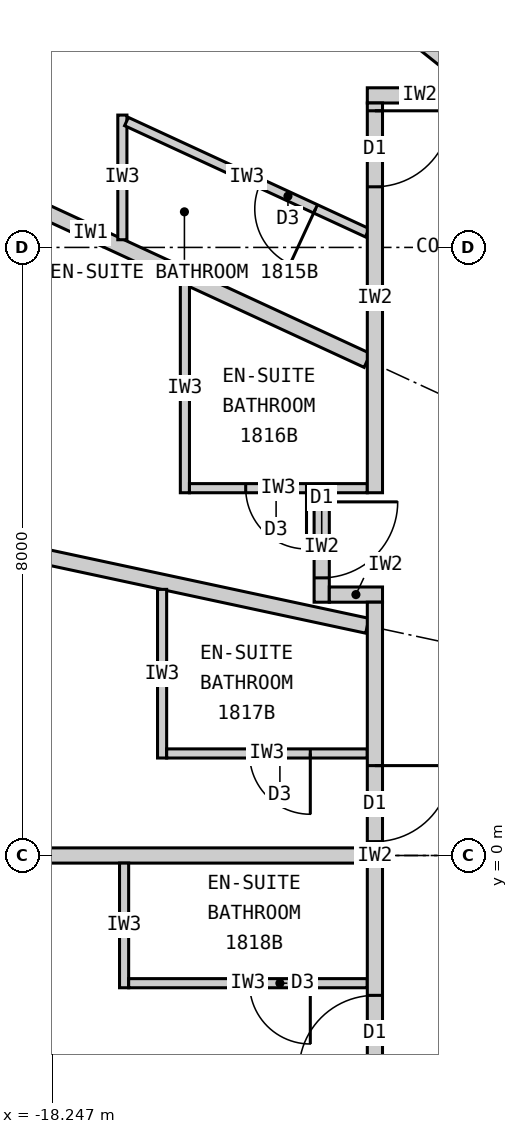
"""IFC4 building model, lengths in metres.
Left out: names, types, materials, properties, quantities, classifications, styles, units other than length and angle.
Written with IfcOpenShell. Run it as: python <this file> out.ifc"""

import sys

from ifc_helpers import new_model, si_unit, direction, frame, frame_2d, origin, place, context, subcontext, project, spatial, rectangle, extrude, element, fill, save


model = new_model("IFC4")
c1 = context("Model", 3, precision=1e-05, world=origin(), true_north=direction((0.0, 1.0)))
c2 = subcontext(c1, "Body", "Model", "MODEL_VIEW")
j1 = project(units=[si_unit("LENGTHUNIT", "METRE"), si_unit("PLANEANGLEUNIT", "RADIAN")], contexts=[c1])
p1 = place(None, origin())
s1 = spatial("IfcSite", under=j1, at=p1, CompositionType="ELEMENT")
p2 = place(p1, origin())
s2 = spatial("IfcBuilding", under=s1, at=p2, CompositionType="ELEMENT")
p3 = place(p2, frame((0.0, 0.0, 73.8)))
s3 = spatial("IfcBuildingStorey", under=s2, at=p3, CompositionType="ELEMENT", Elevation=73.8)
p4 = place(p3, frame((-12.625, 10.1, 0.0), z_axis=(0.0, 0.0, 1.0), x_axis=(-0.780892451574, 0.624665493744, 0.0)))
e1 = element("IfcWall", 1, at=p4, inside=s3, PredefinedType="PARTITIONING", context=c2, shape_type="SweptSolid", body=[
    extrude(rectangle(XDim=6.045, YDim=0.2, at=frame_2d((3.022, 0.0))), origin(), (0.0, 0.0, 1.0), 2.32),
])
p5 = place(p3, frame((-14.1, 6.512, 0.0), z_axis=(0.0, 0.0, 1.0), x_axis=(-0.907832871056, 0.419332181247, 0.0)))
e2 = element("IfcWall", 2, at=p5, inside=s3, PredefinedType="PARTITIONING", context=c2, shape_type="SweptSolid", body=[
    extrude(rectangle(XDim=8.023, YDim=0.2, at=frame_2d((4.011, 0.0))), origin(), (0.0, 0.0, 1.0), 2.32),
])
p6 = place(p3, frame((-14.1, 3.022, 0.0), z_axis=(0.0, 0.0, 1.0), x_axis=(-0.977790014929, 0.209586943072, 0.0)))
e3 = element("IfcWall", 3, at=p6, inside=s3, PredefinedType="PARTITIONING", context=c2, shape_type="SweptSolid", body=[
    extrude(rectangle(XDim=10.087, YDim=0.2, at=frame_2d((5.043, 0.0))), origin(), (0.0, 0.0, 1.0), 2.32),
])
p7 = place(p3, frame((-14.1, 0.0, 0.0), z_axis=(0.0, 0.0, 1.0), x_axis=(-1.0, 0.0, 0.0)))
e4 = element("IfcWall", 4, at=p7, inside=s3, PredefinedType="PARTITIONING", context=c2, shape_type="SweptSolid", body=[
    extrude(rectangle(XDim=10.75, YDim=0.2, at=frame_2d((5.375, 0.0))), origin(), (0.0, 0.0, 1.0), 2.27),
])
p8 = place(p3, frame((-17.323, 8.101, 0.0), z_axis=(0.0, 0.0, 1.0), x_axis=(0.0, 1.0, 0.0)))
e5 = element("IfcWall", 5, at=p8, inside=s3, PredefinedType="PARTITIONING", context=c2, shape_type="SweptSolid", body=[
    extrude(rectangle(XDim=1.64, YDim=0.12, at=frame_2d((0.82, 0.0))), origin(), (0.0, 0.0, 1.0), 3.12),
])
p9 = place(p3, frame((-14.1, 8.193, 0.0), z_axis=(0.0, 0.0, 1.0), x_axis=(-0.907836493557, 0.419324338628, 0.0)))
e6 = element("IfcWall", 6, at=p9, inside=s3, PredefinedType="PARTITIONING", context=c2, shape_type="SweptSolid", body=[
    extrude(rectangle(XDim=3.49, YDim=0.12, at=frame_2d((1.745, 0.0))), origin(), (0.0, 0.0, 1.0), 3.12),
])
p10 = place(p9, frame((0.75, 0.0, 0.0)))
e7 = element("IfcOpeningElement", 7, at=p10, cuts=e6, PredefinedType="OPENING", context=c2, shape_type="SweptSolid", body=[
    extrude(rectangle(XDim=0.8, YDim=2.1, at=frame_2d((0.4, 1.05))), frame((0.0, 0.07, 0.0), z_axis=(0.0, -1.0, 0.0), x_axis=(1.0, 0.0, 0.0)), (0.0, 0.0, 1.0), 0.14),
])
p11 = place(p3, frame((-16.5, 7.521, 0.0), z_axis=(0.0, 0.0, 1.0), x_axis=(0.0, -1.0, 0.0)))
e8 = element("IfcWall", 8, at=p11, inside=s3, PredefinedType="PARTITIONING", context=c2, shape_type="SweptSolid", body=[
    extrude(rectangle(XDim=2.749, YDim=0.12, at=frame_2d((1.374, 0.0))), origin(), (0.0, 0.0, 1.0), 3.12),
])
p12 = place(p3, frame((-14.1, 4.833, 0.0), z_axis=(0.0, 0.0, 1.0), x_axis=(-1.0, 0.0, 0.0)))
e9 = element("IfcWall", 9, at=p12, inside=s3, PredefinedType="PARTITIONING", context=c2, shape_type="SweptSolid", body=[
    extrude(rectangle(XDim=2.34, YDim=0.12, at=frame_2d((1.17, 0.0))), origin(), (0.0, 0.0, 1.0), 3.12),
])
p13 = place(p12, frame((0.8, 0.0, 0.0)))
e10 = element("IfcOpeningElement", 10, at=p13, cuts=e9, PredefinedType="OPENING", context=c2, shape_type="SweptSolid", body=[
    extrude(rectangle(XDim=0.8, YDim=2.1, at=frame_2d((0.4, 1.05))), frame((0.0, 0.07, 0.0), z_axis=(0.0, -1.0, 0.0), x_axis=(1.0, 0.0, 0.0)), (0.0, 0.0, 1.0), 0.14),
])
p14 = place(p3, frame((-16.8, 3.501, 0.0), z_axis=(0.0, 0.0, 1.0), x_axis=(0.0, -1.0, 0.0)))
e11 = element("IfcWall", 11, at=p14, inside=s3, PredefinedType="PARTITIONING", context=c2, shape_type="SweptSolid", body=[
    extrude(rectangle(XDim=2.219, YDim=0.12, at=frame_2d((1.109, 0.0))), origin(), (0.0, 0.0, 1.0), 3.12),
])
p15 = place(p3, frame((-14.1, 1.343, 0.0), z_axis=(0.0, 0.0, 1.0), x_axis=(-1.0, 0.0, 0.0)))
e12 = element("IfcWall", 12, at=p15, inside=s3, PredefinedType="PARTITIONING", context=c2, shape_type="SweptSolid", body=[
    extrude(rectangle(XDim=2.64, YDim=0.12, at=frame_2d((1.32, 0.0))), origin(), (0.0, 0.0, 1.0), 3.12),
])
p16 = place(p15, frame((0.75, 0.0, 0.0)))
e13 = element("IfcOpeningElement", 13, at=p16, cuts=e12, PredefinedType="OPENING", context=c2, shape_type="SweptSolid", body=[
    extrude(rectangle(XDim=0.8, YDim=2.1, at=frame_2d((0.4, 1.05))), frame((0.0, 0.07, 0.0), z_axis=(0.0, -1.0, 0.0), x_axis=(1.0, 0.0, 0.0)), (0.0, 0.0, 1.0), 0.14),
])
p17 = place(p3, frame((-17.3, -0.1, 0.0), z_axis=(0.0, 0.0, 1.0), x_axis=(0.0, -1.0, 0.0)))
e14 = element("IfcWall", 14, at=p17, inside=s3, PredefinedType="PARTITIONING", context=c2, shape_type="SweptSolid", body=[
    extrude(rectangle(XDim=1.64, YDim=0.12, at=frame_2d((0.82, 0.0))), origin(), (0.0, 0.0, 1.0), 3.12),
])
p18 = place(p3, frame((-14.1, -1.68, 0.0), z_axis=(0.0, 0.0, 1.0), x_axis=(-1.0, 0.0, 0.0)))
e15 = element("IfcWall", 15, at=p18, inside=s3, PredefinedType="PARTITIONING", context=c2, shape_type="SweptSolid", body=[
    extrude(rectangle(XDim=3.14, YDim=0.12, at=frame_2d((1.57, 0.0))), origin(), (0.0, 0.0, 1.0), 3.12),
])
p19 = place(p18, frame((0.75, 0.0, 0.0)))
e16 = element("IfcOpeningElement", 16, at=p19, cuts=e15, PredefinedType="OPENING", context=c2, shape_type="SweptSolid", body=[
    extrude(rectangle(XDim=0.8, YDim=2.1, at=frame_2d((0.4, 1.05))), frame((0.0, 0.07, 0.0), z_axis=(0.0, -1.0, 0.0), x_axis=(1.0, 0.0, 0.0)), (0.0, 0.0, 1.0), 0.14),
])
p20 = place(p3, frame((-14.7, 4.772, 0.0), z_axis=(0.0, 0.0, 1.0), x_axis=(0.0, -1.0, 0.0)))
e17 = element("IfcWall", 17, at=p20, inside=s3, PredefinedType="PARTITIONING", context=c2, shape_type="SweptSolid", body=[
    extrude(rectangle(XDim=1.44, YDim=0.2, at=frame_2d((0.72, 0.0))), origin(), (0.0, 0.0, 1.0), 3.12),
])
p21 = place(p20, frame((0.12, 0.0, 0.0)))
e18 = element("IfcOpeningElement", 18, at=p21, cuts=e17, PredefinedType="OPENING", context=c2, shape_type="SweptSolid", body=[
    extrude(rectangle(XDim=1.0, YDim=2.2, at=frame_2d((0.5, 1.1))), frame((0.0, 0.11, 0.0), z_axis=(0.0, -1.0, 0.0), x_axis=(1.0, 0.0, 0.0)), (0.0, 0.0, 1.0), 0.22),
])
p22 = place(p3, frame((-13.9, 3.433, 0.0), z_axis=(0.0, 0.0, 1.0), x_axis=(-1.0, 0.0, 0.0)))
e19 = element("IfcWall", 19, at=p22, inside=s3, PredefinedType="PARTITIONING", context=c2, shape_type="SweptSolid", body=[
    extrude(rectangle(XDim=0.7, YDim=0.2, at=frame_2d((0.35, 0.0))), origin(), (0.0, 0.0, 1.0), 2.32),
])
p23 = place(p3, frame((-14.1, 10.0, 0.0), z_axis=(0.0, 0.0, 1.0), x_axis=(1.0, 0.0, 0.0)))
e20 = element("IfcWall", 20, at=p23, inside=s3, PredefinedType="PARTITIONING", context=c2, shape_type="SweptSolid", body=[
    extrude(rectangle(XDim=2.481, YDim=0.2, at=frame_2d((1.24, 0.0))), origin(), (0.0, 0.0, 1.0), 3.12),
])
p24 = place(p3, frame((-14.0, 9.9, 0.0), z_axis=(0.0, 0.0, 1.0), x_axis=(0.0, -1.0, 0.0)))
e21 = element("IfcWall", 21, at=p24, inside=s3, PredefinedType="PARTITIONING", context=c2, shape_type="SweptSolid", body=[
    extrude(rectangle(XDim=5.127, YDim=0.2, at=frame_2d((2.564, 0.0))), origin(), (0.0, 0.0, 1.0), 3.12),
])
p25 = place(p24, frame((0.103, 0.0, 0.0)))
e22 = element("IfcOpeningElement", 22, at=p25, cuts=e21, PredefinedType="OPENING", context=c2, shape_type="SweptSolid", body=[
    extrude(rectangle(XDim=1.0, YDim=2.2, at=frame_2d((0.5, 1.1))), frame((0.0, 0.11, 0.0), z_axis=(0.0, -1.0, 0.0), x_axis=(1.0, 0.0, 0.0)), (0.0, 0.0, 1.0), 0.22),
])
p26 = place(p3, frame((-14.0, 3.333, 0.0), z_axis=(0.0, 0.0, 1.0), x_axis=(0.0, -1.0, 0.0)))
e23 = element("IfcWall", 23, at=p26, inside=s3, PredefinedType="PARTITIONING", context=c2, shape_type="SweptSolid", body=[
    extrude(rectangle(XDim=6.665, YDim=0.2, at=frame_2d((3.333, 0.0))), origin(), (0.0, 0.0, 1.0), 3.12),
])
p27 = place(p26, frame((2.15, 0.0, 0.0)))
e24 = element("IfcOpeningElement", 24, at=p27, cuts=e23, PredefinedType="OPENING", context=c2, shape_type="SweptSolid", body=[
    extrude(rectangle(XDim=1.0, YDim=2.2, at=frame_2d((0.5, 1.1))), frame((0.0, 0.11, 0.0), z_axis=(0.0, -1.0, 0.0), x_axis=(1.0, 0.0, 0.0)), (0.0, 0.0, 1.0), 0.22),
])
p28 = place(p26, frame((5.173, 0.0, 0.0)))
e25 = element("IfcOpeningElement", 25, at=p28, cuts=e23, PredefinedType="OPENING", context=c2, shape_type="SweptSolid", body=[
    extrude(rectangle(XDim=1.0, YDim=2.2, at=frame_2d((0.5, 1.1))), frame((0.0, 0.11, 0.0), z_axis=(0.0, -1.0, 0.0), x_axis=(1.0, 0.0, 0.0)), (0.0, 0.0, 1.0), 0.22),
])
p29 = place(p10, origin())
e26 = element("IfcDoor", 26, at=p29, inside=s3, OperationType="SINGLE_SWING_LEFT", PredefinedType="DOOR", context=c2, shape_type="SweptSolid", body=[
    extrude(rectangle(XDim=0.8, YDim=2.1, at=frame_2d((0.4, 1.05))), frame((0.0, 0.025, 0.0), z_axis=(0.0, -1.0, 0.0), x_axis=(1.0, 0.0, 0.0)), (0.0, 0.0, 1.0), 0.05),
])
fill(e7, e26)
p30 = place(p25, origin())
e27 = element("IfcDoor", 27, at=p30, inside=s3, OperationType="SINGLE_SWING_LEFT", PredefinedType="DOOR", context=c2, shape_type="SweptSolid", body=[
    extrude(rectangle(XDim=1.0, YDim=2.2, at=frame_2d((0.5, 1.1))), frame((0.0, 0.025, 0.0), z_axis=(0.0, -1.0, 0.0), x_axis=(1.0, 0.0, 0.0)), (0.0, 0.0, 1.0), 0.05),
])
fill(e22, e27)
p31 = place(p13, origin())
e28 = element("IfcDoor", 28, at=p31, inside=s3, OperationType="SINGLE_SWING_LEFT", PredefinedType="DOOR", context=c2, shape_type="SweptSolid", body=[
    extrude(rectangle(XDim=0.8, YDim=2.1, at=frame_2d((0.4, 1.05))), frame((0.0, 0.025, 0.0), z_axis=(0.0, -1.0, 0.0), x_axis=(1.0, 0.0, 0.0)), (0.0, 0.0, 1.0), 0.05),
])
fill(e10, e28)
p32 = place(p21, origin())
e29 = element("IfcDoor", 29, at=p32, inside=s3, OperationType="SINGLE_SWING_LEFT", PredefinedType="DOOR", context=c2, shape_type="SweptSolid", body=[
    extrude(rectangle(XDim=1.0, YDim=2.2, at=frame_2d((0.5, 1.1))), frame((0.0, 0.025, 0.0), z_axis=(0.0, -1.0, 0.0), x_axis=(1.0, 0.0, 0.0)), (0.0, 0.0, 1.0), 0.05),
])
fill(e18, e29)
p33 = place(p16, origin())
e30 = element("IfcDoor", 30, at=p33, inside=s3, OperationType="SINGLE_SWING_LEFT", PredefinedType="DOOR", context=c2, shape_type="SweptSolid", body=[
    extrude(rectangle(XDim=0.8, YDim=2.1, at=frame_2d((0.4, 1.05))), frame((0.0, 0.025, 0.0), z_axis=(0.0, -1.0, 0.0), x_axis=(1.0, 0.0, 0.0)), (0.0, 0.0, 1.0), 0.05),
])
fill(e13, e30)
p34 = place(p27, origin())
e31 = element("IfcDoor", 31, at=p34, inside=s3, OperationType="SINGLE_SWING_LEFT", PredefinedType="DOOR", context=c2, shape_type="SweptSolid", body=[
    extrude(rectangle(XDim=1.0, YDim=2.2, at=frame_2d((0.5, 1.1))), frame((0.0, 0.025, 0.0), z_axis=(0.0, -1.0, 0.0), x_axis=(1.0, 0.0, 0.0)), (0.0, 0.0, 1.0), 0.05),
])
fill(e24, e31)
p35 = place(p19, origin())
e32 = element("IfcDoor", 32, at=p35, inside=s3, OperationType="SINGLE_SWING_LEFT", PredefinedType="DOOR", context=c2, shape_type="SweptSolid", body=[
    extrude(rectangle(XDim=0.8, YDim=2.1, at=frame_2d((0.4, 1.05))), frame((0.0, 0.025, 0.0), z_axis=(0.0, -1.0, 0.0), x_axis=(1.0, 0.0, 0.0)), (0.0, 0.0, 1.0), 0.05),
])
fill(e16, e32)
p36 = place(p28, origin())
e33 = element("IfcDoor", 33, at=p36, inside=s3, OperationType="SINGLE_SWING_RIGHT", PredefinedType="DOOR", context=c2, shape_type="SweptSolid", body=[
    extrude(rectangle(XDim=1.0, YDim=2.2, at=frame_2d((0.5, 1.1))), frame((0.0, 0.025, 0.0), z_axis=(0.0, -1.0, 0.0), x_axis=(1.0, 0.0, 0.0)), (0.0, 0.0, 1.0), 0.05),
])
fill(e25, e33)
save(model, sys.argv[1])
